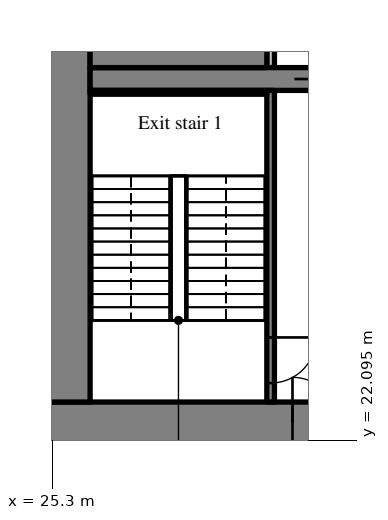
"""IFC4 building model, lengths in metres.
Left out: names, types, materials, properties, quantities, classifications, styles, units other than length and angle.
Written with IfcOpenShell. Run it as: python <this file> out.ifc"""

import sys

from ifc_helpers import new_model, si_unit, direction, frame, frame_2d, origin, place, context, subcontext, project, spatial, rectangle, extrude, source, transform, mapped, element, fill, save


model = new_model("IFC4")
c1 = context("Model", 3, precision=1e-05, world=origin(), true_north=direction((0.0, 1.0)))
c2 = subcontext(c1, "Body", "Model", "MODEL_VIEW")
j1 = project(units=[si_unit("LENGTHUNIT", "METRE"), si_unit("PLANEANGLEUNIT", "RADIAN")], contexts=[c1])
p1 = place(None, origin())
s1 = spatial("IfcSite", under=j1, at=p1, CompositionType="ELEMENT")
p2 = place(p1, origin())
s2 = spatial("IfcBuilding", under=s1, at=p2, CompositionType="ELEMENT")
p3 = place(p2, frame((0.0, 0.0, 11.4)))
s3 = spatial("IfcBuildingStorey", under=s2, at=p3, CompositionType="ELEMENT", Elevation=11.4)
m1 = source(origin(), c2, "Body", "SweptSolid", [
    extrude(rectangle(XDim=50.4, YDim=1.1, at=frame_2d((25.2, 0.0))), origin(), (0.0, 0.0, 1.0), 6.32),
])
p4 = place(p3, frame((25.2, 22.55, 0.0), z_axis=(0.0, 0.0, 1.0), x_axis=(1.0, 0.0, 0.0)))
e1 = element("IfcWall", 1, at=p4, inside=s3, PredefinedType="SHEAR", context=c2, shape_type="MappedRepresentation", body=[
    mapped(m1, transform((0.0, 0.0, 0.0), scale=1.0)),
])
m2 = source(origin(), c2, "Body", "SweptSolid", [
    extrude(rectangle(XDim=1.8, YDim=2.1, at=frame_2d((0.9, 1.05))), frame((0.0, 0.56, 0.0), z_axis=(0.0, -1.0, 0.0), x_axis=(1.0, 0.0, 0.0)), (0.0, 0.0, 1.0), 1.12),
])
p5 = place(p4, frame((15.9, 0.0, 0.0)))
e2 = element("IfcOpeningElement", 2, at=p5, cuts=e1, PredefinedType="OPENING", context=c2, shape_type="MappedRepresentation", body=[
    mapped(m2, transform((0.0, 0.0, 0.0), scale=1.0)),
])
m3 = source(origin(), c2, "Body", "SweptSolid", [
    extrude(rectangle(XDim=1.2, YDim=2.1, at=frame_2d((0.6, 1.05))), frame((0.0, 0.56, 0.0), z_axis=(0.0, -1.0, 0.0), x_axis=(1.0, 0.0, 0.0)), (0.0, 0.0, 1.0), 1.12),
])
p6 = place(p4, frame((27.0, 0.0, 0.0)))
e3 = element("IfcOpeningElement", 3, at=p6, cuts=e1, PredefinedType="OPENING", context=c2, shape_type="MappedRepresentation", body=[
    mapped(m3, transform((0.0, 0.0, 0.0), scale=1.0)),
])
m4 = source(origin(), c2, "Body", "SweptSolid", [
    extrude(rectangle(XDim=0.9, YDim=2.1, at=frame_2d((0.45, 1.05))), frame((0.0, 0.56, 0.0), z_axis=(0.0, -1.0, 0.0), x_axis=(1.0, 0.0, 0.0)), (0.0, 0.0, 1.0), 1.12),
])
p7 = place(p4, frame((34.5, 0.0, 0.0)))
e4 = element("IfcOpeningElement", 4, at=p7, cuts=e1, PredefinedType="OPENING", context=c2, shape_type="MappedRepresentation", body=[
    mapped(m4, transform((0.0, 0.0, 0.0), scale=1.0)),
])
p8 = place(p4, frame((31.5, 0.0, 0.0)))
e5 = element("IfcOpeningElement", 5, at=p8, cuts=e1, PredefinedType="OPENING", context=c2, shape_type="MappedRepresentation", body=[
    mapped(m4, transform((0.0, 0.0, 0.0), scale=1.0)),
])
p9 = place(p4, frame((39.75, 0.0, 0.0)))
e6 = element("IfcOpeningElement", 6, at=p9, cuts=e1, PredefinedType="OPENING", context=c2, shape_type="MappedRepresentation", body=[
    mapped(m4, transform((0.0, 0.0, 0.0), scale=1.0)),
])
p10 = place(p4, frame((36.75, 0.0, 0.0)))
e7 = element("IfcOpeningElement", 7, at=p10, cuts=e1, PredefinedType="OPENING", context=c2, shape_type="MappedRepresentation", body=[
    mapped(m4, transform((0.0, 0.0, 0.0), scale=1.0)),
])
p11 = place(p4, frame((6.425, 0.0, 0.0)))
e8 = element("IfcOpeningElement", 8, at=p11, cuts=e1, PredefinedType="OPENING", context=c2, shape_type="MappedRepresentation", body=[
    mapped(m3, transform((0.0, 0.0, 0.0), scale=1.0)),
])
p12 = place(p4, frame((47.675, 0.0, 0.0)))
e9 = element("IfcOpeningElement", 9, at=p12, cuts=e1, PredefinedType="OPENING", context=c2, shape_type="MappedRepresentation", body=[
    mapped(m3, transform((0.0, 0.0, 0.0), scale=1.0)),
])
m5 = source(origin(), c2, "Body", "SweptSolid", [
    extrude(rectangle(XDim=17.8, YDim=1.1, at=frame_2d((8.9, 0.0))), origin(), (0.0, 0.0, 1.0), 6.32),
])
p13 = place(p3, frame((25.75, 23.1, 0.0), z_axis=(0.0, 0.0, 1.0), x_axis=(0.0, 1.0, 0.0)))
e10 = element("IfcWall", 10, at=p13, inside=s3, PredefinedType="SHEAR", context=c2, shape_type="MappedRepresentation", body=[
    mapped(m5, transform((0.0, 0.0, 0.0), scale=1.0)),
])
m6 = source(origin(), c2, "Body", "SweptSolid", [
    extrude(rectangle(XDim=7.0, YDim=0.6, at=frame_2d((3.5, 0.0))), origin(), (0.0, 0.0, 1.0), 6.32),
])
p14 = place(p3, frame((26.3, 31.6, 0.0), z_axis=(0.0, 0.0, 1.0), x_axis=(1.0, 0.0, 0.0)))
e11 = element("IfcWall", 11, at=p14, inside=s3, PredefinedType="SHEAR", context=c2, shape_type="MappedRepresentation", body=[
    mapped(m6, transform((0.0, 0.0, 0.0), scale=1.0)),
])
m7 = source(origin(), c2, "Body", "SweptSolid", [
    extrude(rectangle(XDim=1.1, YDim=2.1, at=frame_2d((0.55, 1.05))), frame((0.0, 0.31, 0.0), z_axis=(0.0, -1.0, 0.0), x_axis=(1.0, 0.0, 0.0)), (0.0, 0.0, 1.0), 0.62),
])
p15 = place(p14, frame((5.375, 0.0, 0.0)))
e12 = element("IfcOpeningElement", 12, at=p15, cuts=e11, PredefinedType="OPENING", context=c2, shape_type="MappedRepresentation", body=[
    mapped(m7, transform((0.0, 0.0, 0.0), scale=1.0)),
])
m8 = source(origin(), c2, "Body", "SweptSolid", [
    extrude(rectangle(XDim=8.2, YDim=0.2, at=frame_2d((4.1, 0.0))), origin(), (0.0, 0.0, 1.0), 6.32),
])
p16 = place(p3, frame((31.05, 23.1, 0.0), z_axis=(0.0, 0.0, 1.0), x_axis=(0.0, 1.0, 0.0)))
e13 = element("IfcWall", 13, at=p16, inside=s3, PredefinedType="SOLIDWALL", context=c2, shape_type="MappedRepresentation", body=[
    mapped(m8, transform((0.0, 0.0, 0.0), scale=1.0)),
])
m9 = source(origin(), c2, "Body", "SweptSolid", [
    extrude(rectangle(XDim=1.2, YDim=2.1, at=frame_2d((0.6, 1.05))), frame((0.0, 0.11, 0.0), z_axis=(0.0, -1.0, 0.0), x_axis=(1.0, 0.0, 0.0)), (0.0, 0.0, 1.0), 0.22),
])
p17 = place(p16, frame((0.5, 0.0, 0.0)))
e14 = element("IfcOpeningElement", 14, at=p17, cuts=e13, PredefinedType="OPENING", context=c2, shape_type="MappedRepresentation", body=[
    mapped(m9, transform((0.0, 0.0, 0.0), scale=1.0)),
])
m10 = source(origin(), c2, "Body", "SweptSolid", [
    extrude(rectangle(XDim=1.7, YDim=0.2, at=frame_2d((0.85, 0.0))), origin(), (0.0, 0.0, 1.0), 6.32),
])
p18 = place(p3, frame((31.05, 31.9, 0.0), z_axis=(0.0, 0.0, 1.0), x_axis=(0.0, 1.0, 0.0)))
e15 = element("IfcWall", 15, at=p18, inside=s3, PredefinedType="SOLIDWALL", context=c2, shape_type="MappedRepresentation", body=[
    mapped(m10, transform((0.0, 0.0, 0.0), scale=1.0)),
])
m11 = source(origin(), c2, "Body", "SweptSolid", [
    extrude(rectangle(XDim=4.65, YDim=0.1, at=frame_2d((2.325, 0.0))), origin(), (0.0, 0.0, 1.0), 6.32),
])
p19 = place(p3, frame((26.3, 31.25, 0.0), z_axis=(0.0, 0.0, 1.0), x_axis=(1.0, 0.0, 0.0)))
e16 = element("IfcWall", 16, at=p19, inside=s3, PredefinedType="SOLIDWALL", context=c2, shape_type="MappedRepresentation", body=[
    mapped(m11, transform((0.0, 0.0, 0.0), scale=1.0)),
])
m12 = source(origin(), c2, "Body", "SweptSolid", [
    extrude(rectangle(XDim=4.65, YDim=0.9, at=frame_2d((2.325, 0.0))), origin(), (0.0, 0.0, 1.0), 6.32),
])
p20 = place(p3, frame((26.3, 32.35, 0.0), z_axis=(0.0, 0.0, 1.0), x_axis=(1.0, 0.0, 0.0)))
e17 = element("IfcWall", 17, at=p20, inside=s3, PredefinedType="SOLIDWALL", context=c2, shape_type="MappedRepresentation", body=[
    mapped(m12, transform((0.0, 0.0, 0.0), scale=1.0)),
])
m13 = source(origin(), c2, "Body", "SweptSolid", [
    extrude(rectangle(XDim=1.2, YDim=2.1, at=frame_2d((0.6, 1.05))), frame((0.0, 0.025, 0.0), z_axis=(0.0, -1.0, 0.0), x_axis=(1.0, 0.0, 0.0)), (0.0, 0.0, 1.0), 0.05),
])
p21 = place(p17, origin())
e18 = element("IfcDoor", 18, at=p21, inside=s3, OperationType="SINGLE_SWING_RIGHT", PredefinedType="DOOR", context=c2, shape_type="MappedRepresentation", body=[
    mapped(m13, transform((0.0, 0.0, 0.0), scale=1.0)),
])
fill(e14, e18)
m14 = source(origin(), c2, "Body", "SweptSolid", [
    extrude(rectangle(XDim=1.2, YDim=2.1, at=frame_2d((0.6, 1.05))), frame((0.0, 0.325, 0.0), z_axis=(0.0, -1.0, 0.0), x_axis=(1.0, 0.0, 0.0)), (0.0, 0.0, 1.0), 0.05),
])
p22 = place(p11, origin())
e19 = element("IfcDoor", 19, at=p22, inside=s3, OperationType="SINGLE_SWING_LEFT", PredefinedType="DOOR", context=c2, shape_type="MappedRepresentation", body=[
    mapped(m14, transform((0.0, 0.0, 0.0), scale=1.0)),
])
fill(e8, e19)
m15 = source(origin(), c2, "Body", "SweptSolid", [
    extrude(rectangle(XDim=1.1, YDim=2.1, at=frame_2d((0.55, 1.05))), frame((0.0, 0.025, 0.0), z_axis=(0.0, -1.0, 0.0), x_axis=(1.0, 0.0, 0.0)), (0.0, 0.0, 1.0), 0.05),
])
p23 = place(p15, origin())
e20 = element("IfcDoor", 20, at=p23, inside=s3, OperationType="SLIDING_TO_RIGHT", PredefinedType="DOOR", context=c2, shape_type="MappedRepresentation", body=[
    mapped(m15, transform((0.0, 0.0, 0.0), scale=1.0)),
])
fill(e12, e20)
save(model, sys.argv[1])
